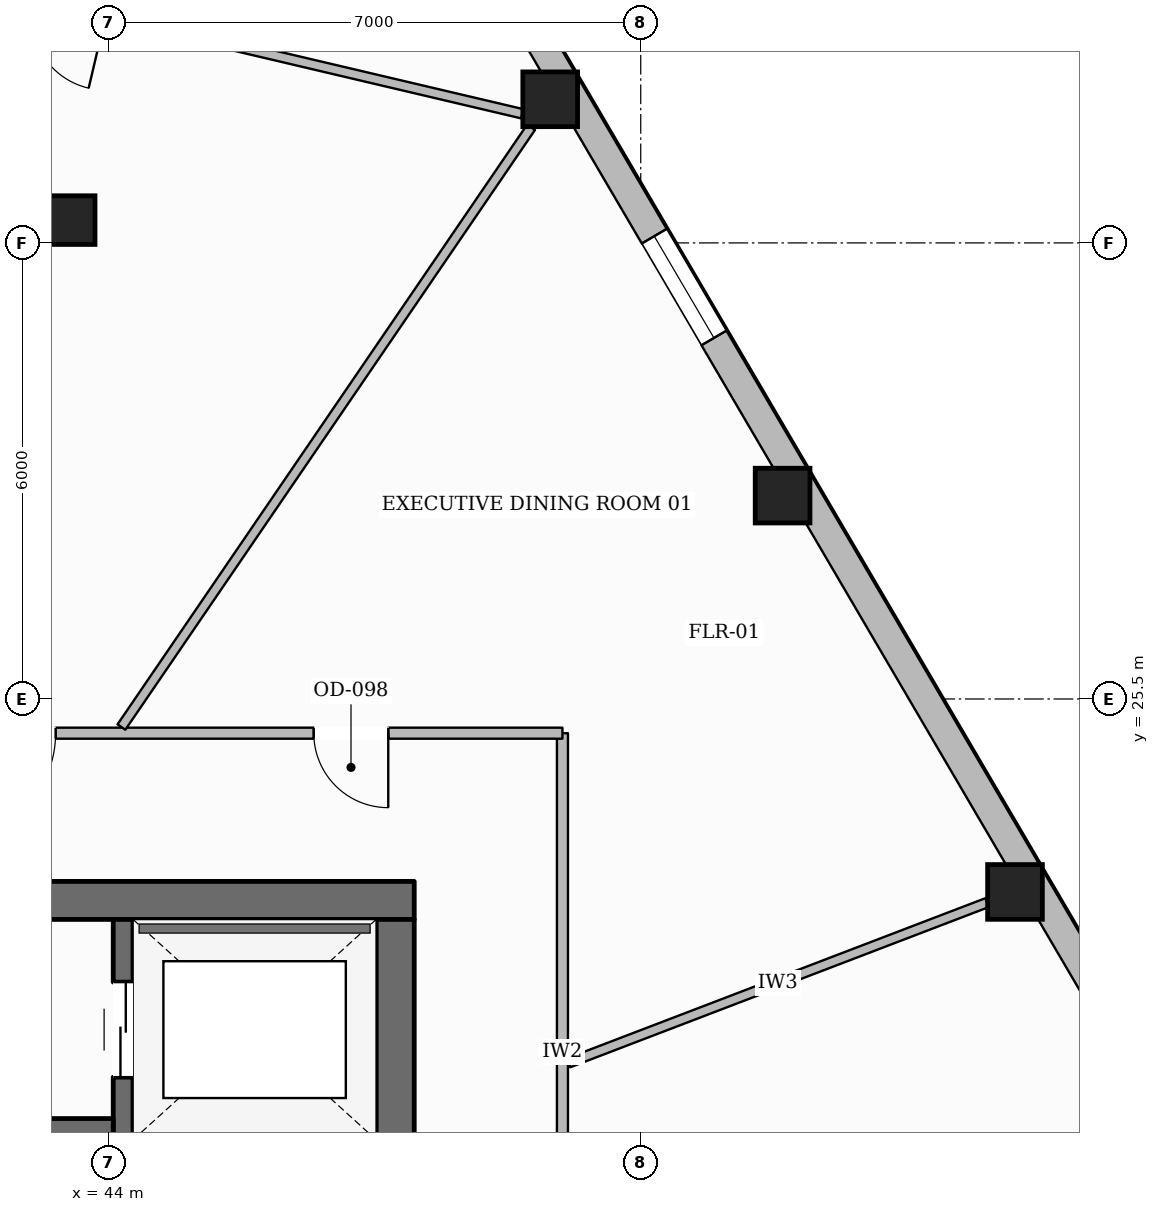
"""IFC4 building model, lengths in metres.
Left out: names, types, materials, properties, quantities, classifications, styles, units other than length and angle.
Written with IfcOpenShell. Run it as: python <this file> out.ifc"""

import sys

from ifc_helpers import new_model, si_unit, direction, frame, frame_2d, origin, origin_2d, place, context, subcontext, project, spatial, rectangle, hollow_rectangle, extrude, element, fill, save


model = new_model("IFC4")
c1 = context("Model", 3, precision=1e-05, world=origin(), true_north=direction((0.0, 1.0)))
c2 = subcontext(c1, "Body", "Model", "MODEL_VIEW")
j1 = project(units=[si_unit("LENGTHUNIT", "METRE"), si_unit("PLANEANGLEUNIT", "RADIAN")], contexts=[c1])
p1 = place(None, origin())
s1 = spatial("IfcSite", under=j1, at=p1, CompositionType="ELEMENT")
p2 = place(p1, origin())
s2 = spatial("IfcBuilding", under=s1, at=p2, CompositionType="ELEMENT")
p3 = place(p2, frame((0.0, 0.0, 131.7)))
s3 = spatial("IfcBuildingStorey", under=s2, at=p3, CompositionType="ELEMENT", Elevation=131.7)
p4 = place(p3, frame((27.98, 22.85, 0.0), z_axis=(0.0, 0.0, 1.0), x_axis=(1.0, 0.0, 0.0)))
e1 = element("IfcWall", 1, at=p4, inside=s3, PredefinedType="SOLIDWALL", context=c2, shape_type="SweptSolid", body=[
    extrude(rectangle(XDim=20.04, YDim=0.5, at=frame_2d((10.02, 0.0))), origin(), (0.0, 0.0, 1.0), 3.6),
])
p5 = place(p4, frame((6.295, 0.0, 0.0)))
e2 = element("IfcOpeningElement", 2, at=p5, cuts=e1, PredefinedType="OPENING", context=c2, shape_type="SweptSolid", body=[
    extrude(rectangle(XDim=1.05, YDim=2.15, at=frame_2d((0.525, 1.075))), frame((0.0, 0.26, 0.0), z_axis=(0.0, -1.0, 0.0), x_axis=(1.0, 0.0, 0.0)), (0.0, 0.0, 1.0), 0.52),
])
p6 = place(p4, frame((12.695, 0.0, 0.0)))
e3 = element("IfcOpeningElement", 3, at=p6, cuts=e1, PredefinedType="OPENING", context=c2, shape_type="SweptSolid", body=[
    extrude(rectangle(XDim=1.05, YDim=2.15, at=frame_2d((0.525, 1.075))), frame((0.0, 0.26, 0.0), z_axis=(0.0, -1.0, 0.0), x_axis=(1.0, 0.0, 0.0)), (0.0, 0.0, 1.0), 0.52),
])
p7 = place(p3, frame((47.77, 9.6, 0.0), z_axis=(0.0, 0.0, 1.0), x_axis=(0.0, 1.0, 0.0)))
e4 = element("IfcWall", 4, at=p7, inside=s3, PredefinedType="SOLIDWALL", context=c2, shape_type="SweptSolid", body=[
    extrude(rectangle(XDim=13.0, YDim=0.5, at=frame_2d((6.5, 0.0))), origin(), (0.0, 0.0, 1.0), 3.6),
])
p8 = place(p7, frame((0.2, 0.0, 0.0)))
e5 = element("IfcOpeningElement", 5, at=p8, cuts=e4, PredefinedType="OPENING", context=c2, shape_type="SweptSolid", body=[
    extrude(rectangle(XDim=1.1, YDim=2.15, at=frame_2d((0.55, 1.075))), frame((0.0, 0.26, 0.0), z_axis=(0.0, -1.0, 0.0), x_axis=(1.0, 0.0, 0.0)), (0.0, 0.0, 1.0), 0.52),
])
p9 = place(p7, frame((8.4, 0.0, 0.0)))
e6 = element("IfcOpeningElement", 6, at=p9, cuts=e4, PredefinedType="OPENING", context=c2, shape_type="SweptSolid", body=[
    extrude(rectangle(XDim=0.9, YDim=2.1, at=frame_2d((0.45, 1.05))), frame((0.0, 0.26, 0.0), z_axis=(0.0, -1.0, 0.0), x_axis=(1.0, 0.0, 0.0)), (0.0, 0.0, 1.0), 0.52),
])
p10 = place(p3, frame((44.19, 9.6, 0.0), z_axis=(0.0, 0.0, 1.0), x_axis=(0.0, 1.0, 0.0)))
e7 = element("IfcWall", 7, at=p10, inside=s3, PredefinedType="SHEAR", context=c2, shape_type="SweptSolid", body=[
    extrude(rectangle(XDim=13.0, YDim=0.26, at=frame_2d((6.5, 0.0))), origin(), (0.0, 0.0, 1.0), 3.6),
])
p11 = place(p10, frame((10.925, 0.0, 0.0)))
e8 = element("IfcOpeningElement", 8, at=p11, cuts=e7, PredefinedType="OPENING", context=c2, shape_type="SweptSolid", body=[
    extrude(rectangle(XDim=1.25, YDim=2.25, at=frame_2d((0.625, 1.125))), frame((0.0, 0.14, 0.0), z_axis=(0.0, -1.0, 0.0), x_axis=(1.0, 0.0, 0.0)), (0.0, 0.0, 1.0), 0.28),
])
p12 = place(p3, frame((31.94, 19.87, 0.0), z_axis=(0.0, 0.0, 1.0), x_axis=(1.0, 0.0, 0.0)))
e9 = element("IfcWall", 9, at=p12, inside=s3, PredefinedType="SOLIDWALL", context=c2, shape_type="SweptSolid", body=[
    extrude(rectangle(XDim=12.12, YDim=0.22, at=frame_2d((6.06, 0.0))), origin(), (0.0, 0.0, 1.0), 3.6),
])
p13 = place(p12, frame((6.3, 0.0, 0.0)))
e10 = element("IfcOpeningElement", 10, at=p13, cuts=e9, PredefinedType="OPENING", context=c2, shape_type="SweptSolid", body=[
    extrude(rectangle(XDim=1.1, YDim=2.15, at=frame_2d((0.55, 1.075))), frame((0.0, 0.12, 0.0), z_axis=(0.0, -1.0, 0.0), x_axis=(1.0, 0.0, 0.0)), (0.0, 0.0, 1.0), 0.24),
])
p14 = place(p12, frame((8.01, 0.0, 0.0)))
e11 = element("IfcOpeningElement", 11, at=p14, cuts=e9, PredefinedType="OPENING", context=c2, shape_type="SweptSolid", body=[
    extrude(rectangle(XDim=0.9, YDim=2.1, at=frame_2d((0.45, 1.05))), frame((0.0, 0.12, 0.0), z_axis=(0.0, -1.0, 0.0), x_axis=(1.0, 0.0, 0.0)), (0.0, 0.0, 1.0), 0.24),
])
p15 = place(p12, frame((10.21, 0.0, 0.0)))
e12 = element("IfcOpeningElement", 12, at=p15, cuts=e9, PredefinedType="OPENING", context=c2, shape_type="SweptSolid", body=[
    extrude(rectangle(XDim=0.9, YDim=2.1, at=frame_2d((0.45, 1.05))), frame((0.0, 0.12, 0.0), z_axis=(0.0, -1.0, 0.0), x_axis=(1.0, 0.0, 0.0)), (0.0, 0.0, 1.0), 0.24),
])
for number, where, z_axis, x_axis in (
    (13, (55.924, 22.961, 0.0), (0.0, 0.0, 1.0), (1.0, 0.0, 0.0)),
    (14, (52.866, 28.176, 0.0), (0.0, 0.0, 1.0), (1.0, 0.0, 0.0)),
    (15, (49.809, 33.389, 0.0), (0.0, 0.0, 1.0), (1.0, 0.0, 0.0)),
):
    element("IfcColumn", number, at=place(p3, frame(where, z_axis=z_axis, x_axis=x_axis)), inside=s3, PredefinedType="COLUMN", context=c2, shape_type="SweptSolid", body=[
        extrude(hollow_rectangle(XDim=0.72, YDim=0.72, WallThickness=0.032, at=origin_2d()), origin(), (0.0, 0.0, 1.0), 3.6),
    ])
p16 = place(p3, frame((43.5, 31.8, 0.0), z_axis=(0.0, 0.0, 1.0), x_axis=(1.0, 0.0, 0.0)))
e16 = element("IfcColumn", 16, at=p16, inside=s3, PredefinedType="COLUMN", context=c2, shape_type="SweptSolid", body=[
    extrude(hollow_rectangle(XDim=0.64, YDim=0.64, WallThickness=0.028, at=origin_2d()), origin(), (0.0, 0.0, 1.0), 3.6),
])
p17 = place(p3, frame((43.687, 44.364, 0.0), z_axis=(0.0, 0.0, 1.0), x_axis=(0.505829244079, -0.862633627813, 0.0)))
e17 = element("IfcWall", 17, at=p17, inside=s3, PredefinedType="STANDARD", context=c2, shape_type="SweptSolid", body=[
    extrude(rectangle(XDim=37.223, YDim=0.38, at=frame_2d((18.611, 0.0))), origin(), (0.0, 0.0, 1.0), 3.059),
])
p18 = place(p17, frame((32.944, 0.0, 0.65)))
e18 = element("IfcOpeningElement", 18, at=p18, cuts=e17, PredefinedType="OPENING", context=c2, shape_type="SweptSolid", body=[
    extrude(rectangle(XDim=1.55, YDim=1.75, at=frame_2d((0.775, 0.875))), frame((0.0, 0.2, 0.0), z_axis=(0.0, -1.0, 0.0), x_axis=(1.0, 0.0, 0.0)), (0.0, 0.0, 1.0), 0.4),
])
p19 = place(p17, frame((26.9, 0.0, 0.65)))
e19 = element("IfcOpeningElement", 19, at=p19, cuts=e17, PredefinedType="OPENING", context=c2, shape_type="SweptSolid", body=[
    extrude(rectangle(XDim=1.55, YDim=1.75, at=frame_2d((0.775, 0.875))), frame((0.0, 0.2, 0.0), z_axis=(0.0, -1.0, 0.0), x_axis=(1.0, 0.0, 0.0)), (0.0, 0.0, 1.0), 0.4),
])
p20 = place(p17, frame((14.811, 0.0, 0.65)))
e20 = element("IfcOpeningElement", 20, at=p20, cuts=e17, PredefinedType="OPENING", context=c2, shape_type="SweptSolid", body=[
    extrude(rectangle(XDim=1.55, YDim=1.75, at=frame_2d((0.775, 0.875))), frame((0.0, 0.2, 0.0), z_axis=(0.0, -1.0, 0.0), x_axis=(1.0, 0.0, 0.0)), (0.0, 0.0, 1.0), 0.4),
])
p21 = place(p17, frame((8.767, 0.0, 0.65)))
e21 = element("IfcOpeningElement", 21, at=p21, cuts=e17, PredefinedType="OPENING", context=c2, shape_type="SweptSolid", body=[
    extrude(rectangle(XDim=1.55, YDim=1.75, at=frame_2d((0.775, 0.875))), frame((0.0, 0.2, 0.0), z_axis=(0.0, -1.0, 0.0), x_axis=(1.0, 0.0, 0.0)), (0.0, 0.0, 1.0), 0.4),
])
p22 = place(p17, frame((2.722, 0.0, 0.65)))
e22 = element("IfcOpeningElement", 22, at=p22, cuts=e17, PredefinedType="OPENING", context=c2, shape_type="SweptSolid", body=[
    extrude(rectangle(XDim=1.55, YDim=1.75, at=frame_2d((0.775, 0.875))), frame((0.0, 0.2, 0.0), z_axis=(0.0, -1.0, 0.0), x_axis=(1.0, 0.0, 0.0)), (0.0, 0.0, 1.0), 0.4),
])
p23 = place(p3, frame((49.97, 7.15, 0.0), z_axis=(0.0, 0.0, 1.0), x_axis=(0.0, 1.0, 0.0)))
e23 = element("IfcWall", 23, at=p23, inside=s3, PredefinedType="PARTITIONING", context=c2, shape_type="SweptSolid", body=[
    extrude(rectangle(XDim=17.9, YDim=0.145, at=frame_2d((8.95, 0.0))), origin(), (0.0, 0.0, 1.0), 3.288),
])
p24 = place(p23, frame((7.874, 0.0, 0.0)))
e24 = element("IfcOpeningElement", 24, at=p24, cuts=e23, PredefinedType="OPENING", context=c2, shape_type="SweptSolid", body=[
    extrude(rectangle(XDim=1.4, YDim=2.2, at=frame_2d((0.7, 1.1))), frame((0.0, 0.083, 0.0), z_axis=(0.0, -1.0, 0.0), x_axis=(1.0, 0.0, 0.0)), (0.0, 0.0, 1.0), 0.165),
])
p25 = place(p3, frame((49.97, 25.05, 0.0), z_axis=(0.0, 0.0, 1.0), x_axis=(-1.0, 0.0, 0.0)))
e25 = element("IfcWall", 25, at=p25, inside=s3, PredefinedType="PARTITIONING", context=c2, shape_type="SweptSolid", body=[
    extrude(rectangle(XDim=23.94, YDim=0.145, at=frame_2d((11.97, 0.0))), origin(), (0.0, 0.0, 1.0), 3.6),
])
p26 = place(p25, frame((14.53, 0.0, 0.0)))
e26 = element("IfcOpeningElement", 26, at=p26, cuts=e25, PredefinedType="OPENING", context=c2, shape_type="SweptSolid", body=[
    extrude(rectangle(XDim=0.88, YDim=2.1, at=frame_2d((0.44, 1.05))), frame((0.0, 0.083, 0.0), z_axis=(0.0, -1.0, 0.0), x_axis=(1.0, 0.0, 0.0)), (0.0, 0.0, 1.0), 0.165),
])
p27 = place(p25, frame((12.01, 0.0, 0.0)))
e27 = element("IfcOpeningElement", 27, at=p27, cuts=e25, PredefinedType="OPENING", context=c2, shape_type="SweptSolid", body=[
    extrude(rectangle(XDim=0.88, YDim=2.1, at=frame_2d((0.44, 1.05))), frame((0.0, 0.083, 0.0), z_axis=(0.0, -1.0, 0.0), x_axis=(1.0, 0.0, 0.0)), (0.0, 0.0, 1.0), 0.165),
])
p28 = place(p25, frame((9.55, 0.0, 0.0)))
e28 = element("IfcOpeningElement", 28, at=p28, cuts=e25, PredefinedType="OPENING", context=c2, shape_type="SweptSolid", body=[
    extrude(rectangle(XDim=0.96, YDim=2.1, at=frame_2d((0.48, 1.05))), frame((0.0, 0.083, 0.0), z_axis=(0.0, -1.0, 0.0), x_axis=(1.0, 0.0, 0.0)), (0.0, 0.0, 1.0), 0.165),
])
p29 = place(p25, frame((2.292, 0.0, 0.0)))
e29 = element("IfcOpeningElement", 29, at=p29, cuts=e25, PredefinedType="OPENING", context=c2, shape_type="SweptSolid", body=[
    extrude(rectangle(XDim=0.98, YDim=2.15, at=frame_2d((0.49, 1.075))), frame((0.0, 0.083, 0.0), z_axis=(0.0, -1.0, 0.0), x_axis=(1.0, 0.0, 0.0)), (0.0, 0.0, 1.0), 0.165),
])
p30 = place(p25, frame((6.668, 0.0, 0.0)))
e30 = element("IfcOpeningElement", 30, at=p30, cuts=e25, PredefinedType="OPENING", context=c2, shape_type="SweptSolid", body=[
    extrude(rectangle(XDim=1.4, YDim=2.2, at=frame_2d((0.7, 1.1))), frame((0.0, 0.083, 0.0), z_axis=(0.0, -1.0, 0.0), x_axis=(1.0, 0.0, 0.0)), (0.0, 0.0, 1.0), 0.165),
])
p31 = place(p25, frame((18.901, 0.0, 0.0)))
e31 = element("IfcOpeningElement", 31, at=p31, cuts=e25, PredefinedType="OPENING", context=c2, shape_type="SweptSolid", body=[
    extrude(rectangle(XDim=1.4, YDim=2.2, at=frame_2d((0.7, 1.1))), frame((0.0, 0.083, 0.0), z_axis=(0.0, -1.0, 0.0), x_axis=(1.0, 0.0, 0.0)), (0.0, 0.0, 1.0), 0.165),
])
p32 = place(p3, frame((50.051, 20.713, 0.0), z_axis=(0.0, 0.0, 1.0), x_axis=(0.933900595494, 0.357532764563, 0.0)))
e32 = element("IfcWall", 32, at=p32, inside=s3, PredefinedType="PARTITIONING", context=c2, shape_type="SweptSolid", body=[
    extrude(rectangle(XDim=5.895, YDim=0.125, at=frame_2d((2.948, 0.0))), origin(), (0.0, 0.0, 1.0), 3.6),
])
p33 = place(p3, frame((44.168, 25.131, 0.0), z_axis=(0.0, 0.0, 1.0), x_axis=(0.564016038555, 0.825763833219, 0.0)))
e33 = element("IfcWall", 33, at=p33, inside=s3, PredefinedType="PARTITIONING", context=c2, shape_type="SweptSolid", body=[
    extrude(rectangle(XDim=9.556, YDim=0.125, at=frame_2d((4.778, 0.0))), origin(), (0.0, 0.0, 1.0), 3.6),
])
p34 = place(p3, frame((49.441, 33.199, 0.0), z_axis=(0.0, 0.0, 1.0), x_axis=(-0.973375761663, 0.229215240784, 0.0)))
e34 = element("IfcWall", 34, at=p34, inside=s3, PredefinedType="PARTITIONING", context=c2, shape_type="SweptSolid", body=[
    extrude(rectangle(XDim=12.454, YDim=0.125, at=frame_2d((6.227, 0.0))), origin(), (0.0, 0.0, 1.0), 3.6),
])
p35 = place(p34, frame((5.63, 0.0, 0.0)))
e35 = element("IfcOpeningElement", 35, at=p35, cuts=e34, PredefinedType="OPENING", context=c2, shape_type="SweptSolid", body=[
    extrude(rectangle(XDim=0.98, YDim=2.15, at=frame_2d((0.49, 1.075))), frame((0.0, 0.073, 0.0), z_axis=(0.0, -1.0, 0.0), x_axis=(1.0, 0.0, 0.0)), (0.0, 0.0, 1.0), 0.145),
])
p36 = place(p20, origin())
e36 = element("IfcWindow", 36, at=p36, inside=s3, PartitioningType="SINGLE_PANEL", PredefinedType="WINDOW", context=c2, shape_type="SweptSolid", body=[
    extrude(rectangle(XDim=1.55, YDim=1.75, at=frame_2d((0.775, 0.875))), frame((0.0, 0.03, 0.0), z_axis=(0.0, -1.0, 0.0), x_axis=(1.0, 0.0, 0.0)), (0.0, 0.0, 1.0), 0.06),
])
fill(e20, e36)
p37 = place(p11, origin())
e37 = element("IfcDoor", 37, at=p37, inside=s3, OperationType="DOUBLE_DOOR_SLIDING", PredefinedType="DOOR", context=c2, shape_type="SweptSolid", body=[
    extrude(rectangle(XDim=1.25, YDim=2.25, at=frame_2d((0.625, 1.125))), frame((0.0, 0.025, 0.0), z_axis=(0.0, -1.0, 0.0), x_axis=(1.0, 0.0, 0.0)), (0.0, 0.0, 1.0), 0.05),
])
fill(e8, e37)
p38 = place(p29, origin())
e38 = element("IfcDoor", 38, at=p38, inside=s3, OperationType="SINGLE_SWING_LEFT", PredefinedType="DOOR", context=c2, shape_type="SweptSolid", body=[
    extrude(rectangle(XDim=0.98, YDim=2.15, at=frame_2d((0.49, 1.075))), frame((0.0, 0.025, 0.0), z_axis=(0.0, -1.0, 0.0), x_axis=(1.0, 0.0, 0.0)), (0.0, 0.0, 1.0), 0.05),
])
fill(e29, e38)
p39 = place(p30, origin())
e39 = element("IfcDoor", 39, at=p39, inside=s3, OperationType="SINGLE_SWING_RIGHT", PredefinedType="DOOR", context=c2, shape_type="SweptSolid", body=[
    extrude(rectangle(XDim=1.4, YDim=2.2, at=frame_2d((0.7, 1.1))), frame((0.0, 0.025, 0.0), z_axis=(0.0, -1.0, 0.0), x_axis=(1.0, 0.0, 0.0)), (0.0, 0.0, 1.0), 0.05),
])
fill(e30, e39)
save(model, sys.argv[1])
